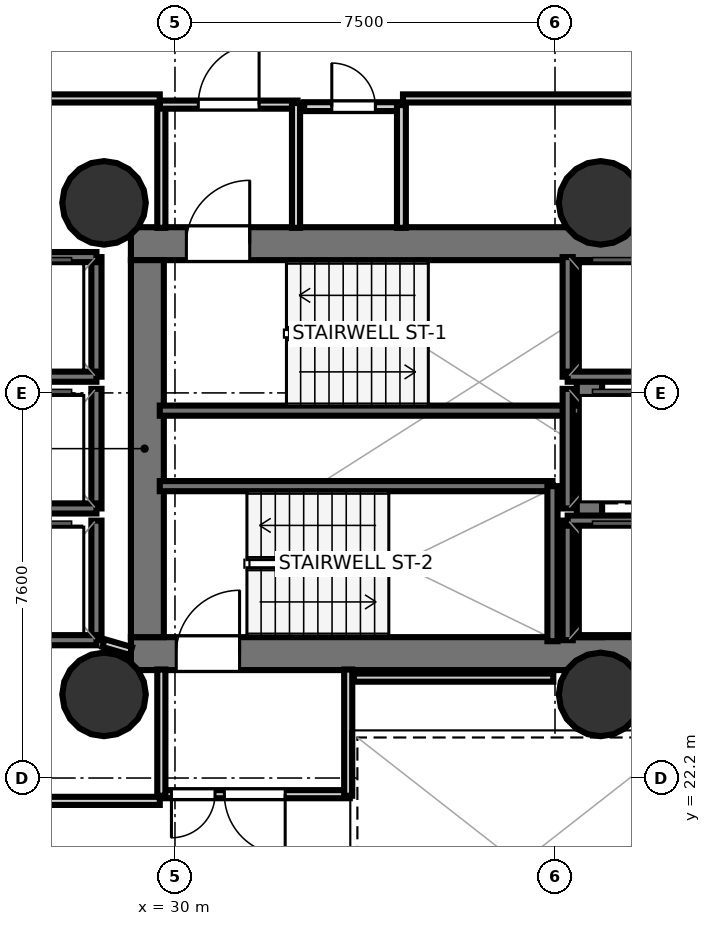
"""IFC4 building model, lengths in metres.
Left out: names, types, materials, properties, quantities, classifications, styles, units other than length and angle.
Written with IfcOpenShell. Run it as: python <this file> out.ifc"""

import sys

from ifc_helpers import new_model, si_unit, direction, frame, frame_2d, origin, origin_2d, place, context, subcontext, project, spatial, rectangle, hollow_circle, extrude, element, fill, save


model = new_model("IFC4")
c1 = context("Model", 3, precision=1e-05, world=origin(), true_north=direction((0.0, 1.0)))
c2 = subcontext(c1, "Body", "Model", "MODEL_VIEW")
j1 = project(units=[si_unit("LENGTHUNIT", "METRE"), si_unit("PLANEANGLEUNIT", "RADIAN")], contexts=[c1])
p1 = place(None, origin())
s1 = spatial("IfcSite", under=j1, at=p1, CompositionType="ELEMENT")
p2 = place(p1, origin())
s2 = spatial("IfcBuilding", under=s1, at=p2, CompositionType="ELEMENT")
p3 = place(p2, frame((0.0, 0.0, 67.3)))
s3 = spatial("IfcBuildingStorey", under=s2, at=p3, CompositionType="ELEMENT", Elevation=67.3)
p4 = place(p3, frame((29.13, 32.745, 0.0), z_axis=(0.0, 0.0, 1.0), x_axis=(1.0, 0.0, 0.0)))
e1 = element("IfcWall", 1, at=p4, inside=s3, PredefinedType="SHEAR", context=c2, shape_type="SweptSolid", body=[
    extrude(rectangle(XDim=10.72, YDim=0.65, at=frame_2d((5.36, 0.0))), origin(), (0.0, 0.0, 1.0), 3.52),
])
p5 = place(p4, frame((1.095, 0.0, 0.0)))
e2 = element("IfcOpeningElement", 2, at=p5, cuts=e1, PredefinedType="OPENING", context=c2, shape_type="SweptSolid", body=[
    extrude(rectangle(XDim=1.25, YDim=2.15, at=frame_2d((0.625, 1.075))), frame((0.0, 0.335, 0.0), z_axis=(0.0, -1.0, 0.0), x_axis=(1.0, 0.0, 0.0)), (0.0, 0.0, 1.0), 0.67),
])
p6 = place(p3, frame((29.13, 24.655, 0.0), z_axis=(0.0, 0.0, 1.0), x_axis=(1.0, 0.0, 0.0)))
e3 = element("IfcWall", 3, at=p6, inside=s3, PredefinedType="SHEAR", context=c2, shape_type="SweptSolid", body=[
    extrude(rectangle(XDim=10.72, YDim=0.65, at=frame_2d((5.36, 0.0))), origin(), (0.0, 0.0, 1.0), 3.52),
])
p7 = place(p6, frame((0.895, 0.0, 0.0)))
e4 = element("IfcOpeningElement", 4, at=p7, cuts=e3, PredefinedType="OPENING", context=c2, shape_type="SweptSolid", body=[
    extrude(rectangle(XDim=1.25, YDim=2.15, at=frame_2d((0.625, 1.075))), frame((0.0, 0.335, 0.0), z_axis=(0.0, -1.0, 0.0), x_axis=(1.0, 0.0, 0.0)), (0.0, 0.0, 1.0), 0.67),
])
p8 = place(p3, frame((29.455, 24.98, 0.0), z_axis=(0.0, 0.0, 1.0), x_axis=(0.0, 1.0, 0.0)))
e5 = element("IfcWall", 5, at=p8, inside=s3, PredefinedType="SHEAR", context=c2, shape_type="SweptSolid", body=[
    extrude(rectangle(XDim=7.44, YDim=0.65, at=frame_2d((3.72, 0.0))), origin(), (0.0, 0.0, 1.0), 3.52),
])
p9 = place(p3, frame((38.18, 24.98, 0.0), z_axis=(0.0, 0.0, 1.0), x_axis=(0.0, 1.0, 0.0)))
e6 = element("IfcWall", 6, at=p9, inside=s3, PredefinedType="SHEAR", context=c2, shape_type="SweptSolid", body=[
    extrude(rectangle(XDim=7.44, YDim=0.5, at=frame_2d((3.72, 0.0))), origin(), (0.0, 0.0, 1.0), 3.52),
])
for number, where, z_axis, x_axis in (
    (7, (28.6, 33.55, 0.0), (0.0, 0.0, 1.0), (1.0, 0.0, 0.0)),
    (8, (28.6, 23.85, 0.0), (0.0, 0.0, 1.0), (1.0, 0.0, 0.0)),
    (9, (38.4, 33.55, 0.0), (0.0, 0.0, 1.0), (1.0, 0.0, 0.0)),
    (10, (38.4, 23.85, 0.0), (0.0, 0.0, 1.0), (1.0, 0.0, 0.0)),
):
    element("IfcColumn", number, at=place(p3, frame(where, z_axis=z_axis, x_axis=x_axis)), inside=s3, PredefinedType="COLUMN", context=c2, shape_type="SweptSolid", body=[
        extrude(hollow_circle(Radius=0.825, WallThickness=0.04, at=origin_2d()), origin(), (0.0, 0.0, 1.0), 3.7),
    ])
p10 = place(p3, frame((29.7, 29.45, 0.0), z_axis=(0.0, 0.0, 1.0), x_axis=(1.0, 0.0, 0.0)))
e11 = element("IfcWall", 11, at=p10, inside=s3, PredefinedType="SOLIDWALL", context=c2, shape_type="SweptSolid", body=[
    extrude(rectangle(XDim=8.3, YDim=0.2, at=frame_2d((4.15, 0.0))), origin(), (0.0, 0.0, 1.0), 3.52),
])
p11 = place(p3, frame((29.7, 27.96, 0.0), z_axis=(0.0, 0.0, 1.0), x_axis=(1.0, 0.0, 0.0)))
e12 = element("IfcWall", 12, at=p11, inside=s3, PredefinedType="SOLIDWALL", context=c2, shape_type="SweptSolid", body=[
    extrude(rectangle(XDim=7.75, YDim=0.2, at=frame_2d((3.875, 0.0))), origin(), (0.0, 0.0, 1.0), 3.52),
])
p12 = place(p3, frame((37.45, 24.9, 0.0), z_axis=(0.0, 0.0, 1.0), x_axis=(0.0, 1.0, 0.0)))
e13 = element("IfcWall", 13, at=p12, inside=s3, PredefinedType="SOLIDWALL", context=c2, shape_type="SweptSolid", body=[
    extrude(rectangle(XDim=3.06, YDim=0.2, at=frame_2d((1.53, 0.0))), origin(), (0.0, 0.0, 1.0), 3.52),
])
p13 = place(p3, frame((37.75, 30.12, 0.0), z_axis=(0.0, 0.0, 1.0), x_axis=(0.0, 1.0, 0.0)))
e14 = element("IfcWall", 14, at=p13, inside=s3, PredefinedType="SOLIDWALL", context=c2, shape_type="SweptSolid", body=[
    extrude(rectangle(XDim=2.36, YDim=0.2, at=frame_2d((1.18, 0.0))), origin(), (0.0, 0.0, 1.0), 3.52),
])
p14 = place(p3, frame((37.75, 30.12, 0.0), z_axis=(0.0, 0.0, 1.0), x_axis=(1.0, 0.0, 0.0)))
e15 = element("IfcWall", 15, at=p14, inside=s3, PredefinedType="SOLIDWALL", context=c2, shape_type="SweptSolid", body=[
    extrude(rectangle(XDim=2.1, YDim=0.2, at=frame_2d((1.05, 0.0))), origin(), (0.0, 0.0, 1.0), 3.52),
])
p15 = place(p3, frame((37.75, 24.92, 0.0), z_axis=(0.0, 0.0, 1.0), x_axis=(0.0, 1.0, 0.0)))
e16 = element("IfcWall", 16, at=p15, inside=s3, PredefinedType="SOLIDWALL", context=c2, shape_type="SweptSolid", body=[
    extrude(rectangle(XDim=2.36, YDim=0.2, at=frame_2d((1.18, 0.0))), origin(), (0.0, 0.0, 1.0), 3.52),
])
p16 = place(p3, frame((37.75, 27.28, 0.0), z_axis=(0.0, 0.0, 1.0), x_axis=(1.0, 0.0, 0.0)))
e17 = element("IfcWall", 17, at=p16, inside=s3, PredefinedType="SOLIDWALL", context=c2, shape_type="SweptSolid", body=[
    extrude(rectangle(XDim=2.1, YDim=0.2, at=frame_2d((1.05, 0.0))), origin(), (0.0, 0.0, 1.0), 3.52),
])
p17 = place(p3, frame((28.45, 30.12, 0.0), z_axis=(0.0, 0.0, 1.0), x_axis=(0.0, 1.0, 0.0)))
e18 = element("IfcWall", 18, at=p17, inside=s3, PredefinedType="SOLIDWALL", context=c2, shape_type="SweptSolid", body=[
    extrude(rectangle(XDim=2.36, YDim=0.2, at=frame_2d((1.18, 0.0))), origin(), (0.0, 0.0, 1.0), 3.52),
])
for number, where, z_axis, x_axis in (
    (19, (26.35, 32.48, 0.0), (0.0, 0.0, 1.0), (1.0, 0.0, 0.0)),
    (20, (26.35, 30.12, 0.0), (0.0, 0.0, 1.0), (1.0, 0.0, 0.0)),
):
    element("IfcWall", number, at=place(p3, frame(where, z_axis=z_axis, x_axis=x_axis)), inside=s3, PredefinedType="SOLIDWALL", context=c2, shape_type="SweptSolid", body=[
        extrude(rectangle(XDim=2.1, YDim=0.2, at=frame_2d((1.05, 0.0))), origin(), (0.0, 0.0, 1.0), 3.52),
    ])
p18 = place(p3, frame((28.45, 27.52, 0.0), z_axis=(0.0, 0.0, 1.0), x_axis=(0.0, 1.0, 0.0)))
e21 = element("IfcWall", 21, at=p18, inside=s3, PredefinedType="SOLIDWALL", context=c2, shape_type="SweptSolid", body=[
    extrude(rectangle(XDim=2.36, YDim=0.2, at=frame_2d((1.18, 0.0))), origin(), (0.0, 0.0, 1.0), 3.52),
])
p19 = place(p3, frame((26.35, 27.52, 0.0), z_axis=(0.0, 0.0, 1.0), x_axis=(1.0, 0.0, 0.0)))
e22 = element("IfcWall", 22, at=p19, inside=s3, PredefinedType="SOLIDWALL", context=c2, shape_type="SweptSolid", body=[
    extrude(rectangle(XDim=2.1, YDim=0.2, at=frame_2d((1.05, 0.0))), origin(), (0.0, 0.0, 1.0), 3.52),
])
p20 = place(p3, frame((28.45, 24.92, 0.0), z_axis=(0.0, 0.0, 1.0), x_axis=(0.0, 1.0, 0.0)))
e23 = element("IfcWall", 23, at=p20, inside=s3, PredefinedType="SOLIDWALL", context=c2, shape_type="SweptSolid", body=[
    extrude(rectangle(XDim=2.36, YDim=0.2, at=frame_2d((1.18, 0.0))), origin(), (0.0, 0.0, 1.0), 3.52),
])
p21 = place(p3, frame((26.35, 24.92, 0.0), z_axis=(0.0, 0.0, 1.0), x_axis=(1.0, 0.0, 0.0)))
e24 = element("IfcWall", 24, at=p21, inside=s3, PredefinedType="SOLIDWALL", context=c2, shape_type="SweptSolid", body=[
    extrude(rectangle(XDim=2.1, YDim=0.2, at=frame_2d((1.05, 0.0))), origin(), (0.0, 0.0, 1.0), 3.52),
])
p22 = place(p3, frame((37.75, 27.52, 0.0), z_axis=(0.0, 0.0, 1.0), x_axis=(0.0, 1.0, 0.0)))
e25 = element("IfcWall", 25, at=p22, inside=s3, PredefinedType="SOLIDWALL", context=c2, shape_type="SweptSolid", body=[
    extrude(rectangle(XDim=2.36, YDim=0.2, at=frame_2d((1.18, 0.0))), origin(), (0.0, 0.0, 1.0), 3.52),
])
p23 = place(p3, frame((29.731, 33.058, 0.0), z_axis=(0.0, 0.0, 1.0), x_axis=(0.0, 1.0, 0.0)))
e26 = element("IfcWall", 26, at=p23, inside=s3, PredefinedType="PARTITIONING", context=c2, shape_type="SweptSolid", body=[
    extrude(rectangle(XDim=2.462, YDim=0.16, at=frame_2d((1.231, 0.0))), origin(), (0.0, 0.0, 1.0), 2.84),
])
p24 = place(p3, frame((29.7, 35.489, 0.0), z_axis=(0.0, 0.0, 1.0), x_axis=(1.0, 0.0, 0.0)))
e27 = element("IfcWall", 27, at=p24, inside=s3, PredefinedType="PARTITIONING", context=c2, shape_type="SweptSolid", body=[
    extrude(rectangle(XDim=2.72, YDim=0.16, at=frame_2d((1.36, 0.0))), origin(), (0.0, 0.0, 1.0), 2.84),
])
p25 = place(p24, frame((0.76, 0.0, 0.0)))
e28 = element("IfcOpeningElement", 28, at=p25, cuts=e27, PredefinedType="OPENING", context=c2, shape_type="SweptSolid", body=[
    extrude(rectangle(XDim=1.2, YDim=2.15, at=frame_2d((0.6, 1.075))), frame((0.0, 0.09, 0.0), z_axis=(0.0, -1.0, 0.0), x_axis=(1.0, 0.0, 0.0)), (0.0, 0.0, 1.0), 0.18),
])
p26 = place(p3, frame((32.389, 35.52, 0.0), z_axis=(0.0, 0.0, 1.0), x_axis=(0.0, -1.0, 0.0)))
e29 = element("IfcWall", 29, at=p26, inside=s3, PredefinedType="PARTITIONING", context=c2, shape_type="SweptSolid", body=[
    extrude(rectangle(XDim=2.462, YDim=0.16, at=frame_2d((1.231, 0.0))), origin(), (0.0, 0.0, 1.0), 2.84),
])
p27 = place(p3, frame((33.45, 21.881, 0.0), z_axis=(0.0, 0.0, 1.0), x_axis=(-1.0, 0.0, 0.0)))
e30 = element("IfcWall", 30, at=p27, inside=s3, PredefinedType="PARTITIONING", context=c2, shape_type="SweptSolid", body=[
    extrude(rectangle(XDim=3.75, YDim=0.16, at=frame_2d((1.875, 0.0))), origin(), (0.0, 0.0, 1.0), 2.84),
])
p28 = place(p27, frame((1.275, 0.0, 0.0)))
e31 = element("IfcOpeningElement", 31, at=p28, cuts=e30, PredefinedType="OPENING", context=c2, shape_type="SweptSolid", body=[
    extrude(rectangle(XDim=1.2, YDim=2.15, at=frame_2d((0.6, 1.075))), frame((0.0, 0.09, 0.0), z_axis=(0.0, -1.0, 0.0), x_axis=(1.0, 0.0, 0.0)), (0.0, 0.0, 1.0), 0.18),
])
p29 = place(p27, frame((2.66, 0.0, 0.0)))
e32 = element("IfcOpeningElement", 32, at=p29, cuts=e30, PredefinedType="OPENING", context=c2, shape_type="SweptSolid", body=[
    extrude(rectangle(XDim=0.86, YDim=2.05, at=frame_2d((0.43, 1.025))), frame((0.0, 0.09, 0.0), z_axis=(0.0, -1.0, 0.0), x_axis=(1.0, 0.0, 0.0)), (0.0, 0.0, 1.0), 0.18),
])
for number, where, z_axis, x_axis in (
    (33, (29.731, 21.85, 0.0), (0.0, 0.0, 1.0), (0.0, 1.0, 0.0)),
    (34, (33.419, 24.342, 0.0), (0.0, 0.0, 1.0), (0.0, -1.0, 0.0)),
):
    element("IfcWall", number, at=place(p3, frame(where, z_axis=z_axis, x_axis=x_axis)), inside=s3, PredefinedType="PARTITIONING", context=c2, shape_type="SweptSolid", body=[
        extrude(rectangle(XDim=2.492, YDim=0.16, at=frame_2d((1.246, 0.0))), origin(), (0.0, 0.0, 1.0), 2.84),
    ])
p30 = place(p3, frame((32.55, 35.449, 0.0), z_axis=(0.0, 0.0, 1.0), x_axis=(1.0, 0.0, 0.0)))
e35 = element("IfcWall", 35, at=p30, inside=s3, PredefinedType="PLUMBINGWALL", context=c2, shape_type="SweptSolid", body=[
    extrude(rectangle(XDim=1.95, YDim=0.175, at=frame_2d((0.975, 0.0))), origin(), (0.0, 0.0, 1.0), 2.84),
])
p31 = place(p30, frame((0.545, 0.0, 0.0)))
e36 = element("IfcOpeningElement", 36, at=p31, cuts=e35, PredefinedType="OPENING", context=c2, shape_type="SweptSolid", body=[
    extrude(rectangle(XDim=0.86, YDim=2.05, at=frame_2d((0.43, 1.025))), frame((0.0, 0.097, 0.0), z_axis=(0.0, -1.0, 0.0), x_axis=(1.0, 0.0, 0.0)), (0.0, 0.0, 1.0), 0.195),
])
p32 = place(p3, frame((34.469, 35.48, 0.0), z_axis=(0.0, 0.0, 1.0), x_axis=(0.0, -1.0, 0.0)))
e37 = element("IfcWall", 37, at=p32, inside=s3, PredefinedType="PLUMBINGWALL", context=c2, shape_type="SweptSolid", body=[
    extrude(rectangle(XDim=2.422, YDim=0.175, at=frame_2d((1.211, 0.0))), origin(), (0.0, 0.0, 1.0), 2.84),
])
p33 = place(p3, frame((29.13, 24.706, 0.0), z_axis=(0.0, 0.0, 1.0), x_axis=(-0.960451214223, 0.278448316742, 0.0)))
e38 = element("IfcWall", 38, at=p33, inside=s3, PredefinedType="PARTITIONING", context=c2, shape_type="SweptSolid", body=[
    extrude(rectangle(XDim=0.562, YDim=0.16, at=frame_2d((0.281, 0.0))), origin(), (0.0, 0.0, 1.0), 2.84),
])
p34 = place(p3, frame((37.467, 24.181, 0.0), z_axis=(0.0, 0.0, 1.0), x_axis=(-1.0, 0.0, 0.0)))
e39 = element("IfcWall", 39, at=p34, inside=s3, PredefinedType="PARTITIONING", context=c2, shape_type="SweptSolid", body=[
    extrude(rectangle(XDim=3.937, YDim=0.16, at=frame_2d((1.968, 0.0))), origin(), (0.0, 0.0, 1.0), 2.84),
])
p35 = place(p3, frame((39.818, 35.611, 0.0), z_axis=(0.0, 0.0, 1.0), x_axis=(-1.0, 0.0, 0.0)))
e40 = element("IfcWall", 40, at=p35, inside=s3, PredefinedType="PARTITIONING", context=c2, shape_type="SweptSolid", body=[
    extrude(rectangle(XDim=5.318, YDim=0.16, at=frame_2d((2.659, 0.0))), origin(), (0.0, 0.0, 1.0), 2.84),
])
p36 = place(p3, frame((29.7, 35.611, 0.0), z_axis=(0.0, 0.0, 1.0), x_axis=(-1.0, 0.0, 0.0)))
e41 = element("IfcWall", 41, at=p36, inside=s3, PredefinedType="PARTITIONING", context=c2, shape_type="SweptSolid", body=[
    extrude(rectangle(XDim=3.28, YDim=0.16, at=frame_2d((1.64, 0.0))), origin(), (0.0, 0.0, 1.0), 2.798),
])
p37 = place(p3, frame((26.42, 21.749, 0.0), z_axis=(0.0, 0.0, 1.0), x_axis=(1.0, 0.0, 0.0)))
e42 = element("IfcWall", 42, at=p37, inside=s3, PredefinedType="PARTITIONING", context=c2, shape_type="SweptSolid", body=[
    extrude(rectangle(XDim=3.28, YDim=0.16, at=frame_2d((1.64, 0.0))), origin(), (0.0, 0.0, 1.0), 2.84),
])
p38 = place(p3, frame((36.167, 44.385, 0.0), z_axis=(0.0, 0.0, 1.0), x_axis=(0.734284800638, -0.678841536408, 0.0)))
e43 = element("IfcWall", 43, at=p38, inside=s3, PredefinedType="PARTITIONING", context=c2, shape_type="SweptSolid", body=[
    extrude(rectangle(XDim=31.198, YDim=0.14, at=frame_2d((15.599, 0.0))), origin(), (0.0, 0.0, 1.0), 2.798),
])
p39 = place(p5, origin())
e44 = element("IfcDoor", 44, at=p39, inside=s3, OperationType="SINGLE_SWING_RIGHT", PredefinedType="DOOR", context=c2, shape_type="SweptSolid", body=[
    extrude(rectangle(XDim=1.25, YDim=2.15, at=frame_2d((0.625, 1.075))), frame((0.0, 0.025, 0.0), z_axis=(0.0, -1.0, 0.0), x_axis=(1.0, 0.0, 0.0)), (0.0, 0.0, 1.0), 0.05),
])
fill(e2, e44)
p40 = place(p7, origin())
e45 = element("IfcDoor", 45, at=p40, inside=s3, OperationType="SINGLE_SWING_RIGHT", PredefinedType="DOOR", context=c2, shape_type="SweptSolid", body=[
    extrude(rectangle(XDim=1.25, YDim=2.15, at=frame_2d((0.625, 1.075))), frame((0.0, 0.025, 0.0), z_axis=(0.0, -1.0, 0.0), x_axis=(1.0, 0.0, 0.0)), (0.0, 0.0, 1.0), 0.05),
])
fill(e4, e45)
p41 = place(p25, origin())
e46 = element("IfcDoor", 46, at=p41, inside=s3, OperationType="SINGLE_SWING_RIGHT", PredefinedType="DOOR", context=c2, shape_type="SweptSolid", body=[
    extrude(rectangle(XDim=1.2, YDim=2.15, at=frame_2d((0.6, 1.075))), frame((0.0, 0.025, 0.0), z_axis=(0.0, -1.0, 0.0), x_axis=(1.0, 0.0, 0.0)), (0.0, 0.0, 1.0), 0.05),
])
fill(e28, e46)
p42 = place(p28, origin())
e47 = element("IfcDoor", 47, at=p42, inside=s3, OperationType="SINGLE_SWING_LEFT", PredefinedType="DOOR", context=c2, shape_type="SweptSolid", body=[
    extrude(rectangle(XDim=1.2, YDim=2.15, at=frame_2d((0.6, 1.075))), frame((0.0, 0.025, 0.0), z_axis=(0.0, -1.0, 0.0), x_axis=(1.0, 0.0, 0.0)), (0.0, 0.0, 1.0), 0.05),
])
fill(e31, e47)
p43 = place(p31, origin())
e48 = element("IfcDoor", 48, at=p43, inside=s3, OperationType="SINGLE_SWING_LEFT", PredefinedType="DOOR", context=c2, shape_type="SweptSolid", body=[
    extrude(rectangle(XDim=0.86, YDim=2.05, at=frame_2d((0.43, 1.025))), frame((0.0, 0.025, 0.0), z_axis=(0.0, -1.0, 0.0), x_axis=(1.0, 0.0, 0.0)), (0.0, 0.0, 1.0), 0.05),
])
fill(e36, e48)
p44 = place(p29, origin())
e49 = element("IfcDoor", 49, at=p44, inside=s3, OperationType="SINGLE_SWING_RIGHT", PredefinedType="DOOR", context=c2, shape_type="SweptSolid", body=[
    extrude(rectangle(XDim=0.86, YDim=2.05, at=frame_2d((0.43, 1.025))), frame((0.0, 0.025, 0.0), z_axis=(0.0, -1.0, 0.0), x_axis=(1.0, 0.0, 0.0)), (0.0, 0.0, 1.0), 0.05),
])
fill(e32, e49)
save(model, sys.argv[1])
